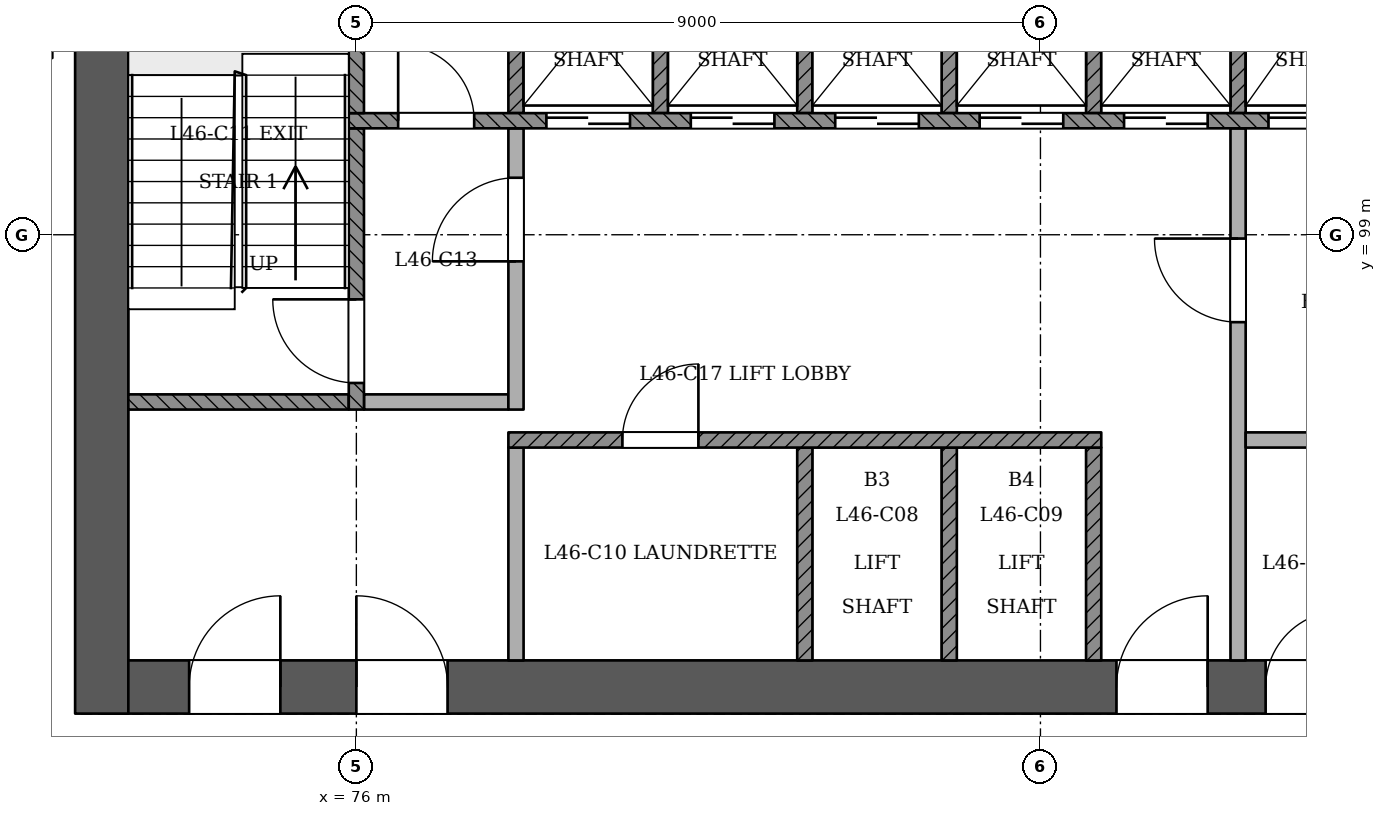
"""IFC4 building model, lengths in metres.
Left out: names, types, materials, properties, quantities, classifications, styles, units other than length and angle.
Written with IfcOpenShell. Run it as: python <this file> out.ifc"""

import sys

from ifc_helpers import new_model, si_unit, direction, frame, frame_2d, origin, place, context, subcontext, project, spatial, rectangle, extrude, element, fill, save


model = new_model("IFC4")
c1 = context("Model", 3, precision=1e-05, world=origin(), true_north=direction((0.0, 1.0)))
c2 = subcontext(c1, "Body", "Model", "MODEL_VIEW")
j1 = project(units=[si_unit("LENGTHUNIT", "METRE"), si_unit("PLANEANGLEUNIT", "RADIAN")], contexts=[c1])
p1 = place(None, origin())
s1 = spatial("IfcSite", under=j1, at=p1, CompositionType="ELEMENT")
p2 = place(p1, origin())
s2 = spatial("IfcBuilding", under=s1, at=p2, CompositionType="ELEMENT")
p3 = place(p2, frame((0.0, 0.0, 178.2)))
s3 = spatial("IfcBuildingStorey", under=s2, at=p3, CompositionType="ELEMENT", Elevation=178.2)
p4 = place(p3, frame((72.65, 93.05, 0.0), z_axis=(0.0, 0.0, 1.0), x_axis=(1.0, 0.0, 0.0)))
e1 = element("IfcWall", 1, at=p4, inside=s3, PredefinedType="SHEAR", context=c2, shape_type="SweptSolid", body=[
    extrude(rectangle(XDim=25.05, YDim=0.7, at=frame_2d((12.525, 0.0))), origin(), (0.0, 0.0, 1.0), 3.6),
])
p5 = place(p4, frame((1.15, 0.0, 0.0)))
e2 = element("IfcOpeningElement", 2, at=p5, cuts=e1, PredefinedType="OPENING", context=c2, shape_type="SweptSolid", body=[
    extrude(rectangle(XDim=1.2, YDim=2.1, at=frame_2d((0.6, 1.05))), frame((0.0, 0.36, 0.0), z_axis=(0.0, -1.0, 0.0), x_axis=(1.0, 0.0, 0.0)), (0.0, 0.0, 1.0), 0.721),
])
p6 = place(p4, frame((3.35, 0.0, 0.0)))
e3 = element("IfcOpeningElement", 3, at=p6, cuts=e1, PredefinedType="OPENING", context=c2, shape_type="SweptSolid", body=[
    extrude(rectangle(XDim=1.2, YDim=2.1, at=frame_2d((0.6, 1.05))), frame((0.0, 0.36, 0.0), z_axis=(0.0, -1.0, 0.0), x_axis=(1.0, 0.0, 0.0)), (0.0, 0.0, 1.0), 0.721),
])
p7 = place(p4, frame((13.35, 0.0, 0.0)))
e4 = element("IfcOpeningElement", 4, at=p7, cuts=e1, PredefinedType="OPENING", context=c2, shape_type="SweptSolid", body=[
    extrude(rectangle(XDim=1.2, YDim=2.1, at=frame_2d((0.6, 1.05))), frame((0.0, 0.36, 0.0), z_axis=(0.0, -1.0, 0.0), x_axis=(1.0, 0.0, 0.0)), (0.0, 0.0, 1.0), 0.721),
])
p8 = place(p4, frame((15.312, 0.0, 0.0)))
e5 = element("IfcOpeningElement", 5, at=p8, cuts=e1, PredefinedType="OPENING", context=c2, shape_type="SweptSolid", body=[
    extrude(rectangle(XDim=1.0, YDim=2.1, at=frame_2d((0.5, 1.05))), frame((0.0, 0.36, 0.0), z_axis=(0.0, -1.0, 0.0), x_axis=(1.0, 0.0, 0.0)), (0.0, 0.0, 1.0), 0.721),
])
p9 = place(p4, frame((18.15, 0.0, 0.0)))
e6 = element("IfcOpeningElement", 6, at=p9, cuts=e1, PredefinedType="OPENING", context=c2, shape_type="SweptSolid", body=[
    extrude(rectangle(XDim=1.0, YDim=2.1, at=frame_2d((0.5, 1.05))), frame((0.0, 0.36, 0.0), z_axis=(0.0, -1.0, 0.0), x_axis=(1.0, 0.0, 0.0)), (0.0, 0.0, 1.0), 0.721),
])
p10 = place(p4, frame((21.05, 0.0, 0.0)))
e7 = element("IfcOpeningElement", 7, at=p10, cuts=e1, PredefinedType="OPENING", context=c2, shape_type="SweptSolid", body=[
    extrude(rectangle(XDim=1.0, YDim=2.1, at=frame_2d((0.5, 1.05))), frame((0.0, 0.36, 0.0), z_axis=(0.0, -1.0, 0.0), x_axis=(1.0, 0.0, 0.0)), (0.0, 0.0, 1.0), 0.721),
])
p11 = place(p4, frame((22.938, 0.0, 0.0)))
e8 = element("IfcOpeningElement", 8, at=p11, cuts=e1, PredefinedType="OPENING", context=c2, shape_type="SweptSolid", body=[
    extrude(rectangle(XDim=1.0, YDim=2.1, at=frame_2d((0.5, 1.05))), frame((0.0, 0.36, 0.0), z_axis=(0.0, -1.0, 0.0), x_axis=(1.0, 0.0, 0.0)), (0.0, 0.0, 1.0), 0.721),
])
p12 = place(p3, frame((72.65, 103.75, 0.0), z_axis=(0.0, 0.0, 1.0), x_axis=(0.0, -1.0, 0.0)))
e9 = element("IfcWall", 9, at=p12, inside=s3, PredefinedType="SHEAR", context=c2, shape_type="SweptSolid", body=[
    extrude(rectangle(XDim=11.05, YDim=0.7, at=frame_2d((5.525, 0.0))), origin(), (0.0, 0.0, 1.0), 3.6),
])
p13 = place(p3, frame((78.1, 93.4, 0.0), z_axis=(0.0, 0.0, 1.0), x_axis=(0.0, 1.0, 0.0)))
e10 = element("IfcWall", 10, at=p13, inside=s3, PredefinedType="PARTITIONING", context=c2, shape_type="SweptSolid", body=[
    extrude(rectangle(XDim=2.8, YDim=0.2, at=frame_2d((1.4, 0.0))), origin(), (0.0, 0.0, 1.0), 3.15),
])
for number, where, z_axis, x_axis in (
    (11, (81.9, 93.4, 0.0), (0.0, 0.0, 1.0), (0.0, 1.0, 0.0)),
    (12, (83.8, 93.4, 0.0), (0.0, 0.0, 1.0), (0.0, 1.0, 0.0)),
    (13, (85.7, 93.4, 0.0), (0.0, 0.0, 1.0), (0.0, 1.0, 0.0)),
):
    element("IfcWall", number, at=place(p3, frame(where, z_axis=z_axis, x_axis=x_axis)), inside=s3, PredefinedType="SOLIDWALL", context=c2, shape_type="SweptSolid", body=[
        extrude(rectangle(XDim=2.8, YDim=0.2, at=frame_2d((1.4, 0.0))), origin(), (0.0, 0.0, 1.0), 3.15),
    ])
p14 = place(p3, frame((87.6, 93.4, 0.0), z_axis=(0.0, 0.0, 1.0), x_axis=(0.0, 1.0, 0.0)))
e14 = element("IfcWall", 14, at=p14, inside=s3, PredefinedType="PARTITIONING", context=c2, shape_type="SweptSolid", body=[
    extrude(rectangle(XDim=7.0, YDim=0.2, at=frame_2d((3.5, 0.0))), origin(), (0.0, 0.0, 1.0), 3.15),
])
p15 = place(p14, frame((4.45, 0.0, 0.0)))
e15 = element("IfcOpeningElement", 15, at=p15, cuts=e14, PredefinedType="OPENING", context=c2, shape_type="SweptSolid", body=[
    extrude(rectangle(XDim=1.1, YDim=2.1, at=frame_2d((0.55, 1.05))), frame((0.0, 0.11, 0.0), z_axis=(0.0, -1.0, 0.0), x_axis=(1.0, 0.0, 0.0)), (0.0, 0.0, 1.0), 0.221),
])
p16 = place(p3, frame((78.0, 96.3, 0.0), z_axis=(0.0, 0.0, 1.0), x_axis=(1.0, 0.0, 0.0)))
e16 = element("IfcWall", 16, at=p16, inside=s3, PredefinedType="SOLIDWALL", context=c2, shape_type="SweptSolid", body=[
    extrude(rectangle(XDim=7.8, YDim=0.2, at=frame_2d((3.9, 0.0))), origin(), (0.0, 0.0, 1.0), 3.15),
])
p17 = place(p16, frame((1.5, 0.0, 0.0)))
e17 = element("IfcOpeningElement", 17, at=p17, cuts=e16, PredefinedType="OPENING", context=c2, shape_type="SweptSolid", body=[
    extrude(rectangle(XDim=1.0, YDim=2.1, at=frame_2d((0.5, 1.05))), frame((0.0, 0.11, 0.0), z_axis=(0.0, -1.0, 0.0), x_axis=(1.0, 0.0, 0.0)), (0.0, 0.0, 1.0), 0.221),
])
p18 = place(p3, frame((87.7, 96.3, 0.0), z_axis=(0.0, 0.0, 1.0), x_axis=(1.0, 0.0, 0.0)))
e18 = element("IfcWall", 18, at=p18, inside=s3, PredefinedType="PARTITIONING", context=c2, shape_type="SweptSolid", body=[
    extrude(rectangle(XDim=3.6, YDim=0.2, at=frame_2d((1.8, 0.0))), origin(), (0.0, 0.0, 1.0), 3.15),
])
p19 = place(p3, frame((73.0, 96.8, 0.0), z_axis=(0.0, 0.0, 1.0), x_axis=(1.0, 0.0, 0.0)))
e19 = element("IfcWall", 19, at=p19, inside=s3, PredefinedType="SOLIDWALL", context=c2, shape_type="SweptSolid", body=[
    extrude(rectangle(XDim=2.9, YDim=0.2, at=frame_2d((1.45, 0.0))), origin(), (0.0, 0.0, 1.0), 3.15),
])
p20 = place(p3, frame((76.0, 96.7, 0.0), z_axis=(0.0, 0.0, 1.0), x_axis=(0.0, 1.0, 0.0)))
e20 = element("IfcWall", 20, at=p20, inside=s3, PredefinedType="SOLIDWALL", context=c2, shape_type="SweptSolid", body=[
    extrude(rectangle(XDim=3.7, YDim=0.2, at=frame_2d((1.85, 0.0))), origin(), (0.0, 0.0, 1.0), 3.15),
])
p21 = place(p20, frame((0.35, 0.0, 0.0)))
e21 = element("IfcOpeningElement", 21, at=p21, cuts=e20, PredefinedType="OPENING", context=c2, shape_type="SweptSolid", body=[
    extrude(rectangle(XDim=1.1, YDim=2.1, at=frame_2d((0.55, 1.05))), frame((0.0, 0.11, 0.0), z_axis=(0.0, -1.0, 0.0), x_axis=(1.0, 0.0, 0.0)), (0.0, 0.0, 1.0), 0.221),
])
p22 = place(p3, frame((76.1, 96.8, 0.0), z_axis=(0.0, 0.0, 1.0), x_axis=(1.0, 0.0, 0.0)))
e22 = element("IfcWall", 22, at=p22, inside=s3, PredefinedType="PARTITIONING", context=c2, shape_type="SweptSolid", body=[
    extrude(rectangle(XDim=1.9, YDim=0.2, at=frame_2d((0.95, 0.0))), origin(), (0.0, 0.0, 1.0), 3.15),
])
p23 = place(p3, frame((78.1, 96.7, 0.0), z_axis=(0.0, 0.0, 1.0), x_axis=(0.0, 1.0, 0.0)))
e23 = element("IfcWall", 23, at=p23, inside=s3, PredefinedType="PARTITIONING", context=c2, shape_type="SweptSolid", body=[
    extrude(rectangle(XDim=3.7, YDim=0.2, at=frame_2d((1.85, 0.0))), origin(), (0.0, 0.0, 1.0), 3.15),
])
p24 = place(p23, frame((1.95, 0.0, 0.0)))
e24 = element("IfcOpeningElement", 24, at=p24, cuts=e23, PredefinedType="OPENING", context=c2, shape_type="SweptSolid", body=[
    extrude(rectangle(XDim=1.1, YDim=2.1, at=frame_2d((0.55, 1.05))), frame((0.0, 0.11, 0.0), z_axis=(0.0, -1.0, 0.0), x_axis=(1.0, 0.0, 0.0)), (0.0, 0.0, 1.0), 0.221),
])
p25 = place(p3, frame((75.9, 100.5, 0.0), z_axis=(0.0, 0.0, 1.0), x_axis=(1.0, 0.0, 0.0)))
e25 = element("IfcWall", 25, at=p25, inside=s3, PredefinedType="SOLIDWALL", context=c2, shape_type="SweptSolid", body=[
    extrude(rectangle(XDim=18.2, YDim=0.2, at=frame_2d((9.1, 0.0))), origin(), (0.0, 0.0, 1.0), 3.15),
])
p26 = place(p25, frame((2.6, 0.0, 0.0)))
e26 = element("IfcOpeningElement", 26, at=p26, cuts=e25, PredefinedType="OPENING", context=c2, shape_type="SweptSolid", body=[
    extrude(rectangle(XDim=1.1, YDim=2.1, at=frame_2d((0.55, 1.05))), frame((0.0, 0.11, 0.0), z_axis=(0.0, -1.0, 0.0), x_axis=(1.0, 0.0, 0.0)), (0.0, 0.0, 1.0), 0.221),
])
p27 = place(p25, frame((4.5, 0.0, 0.0)))
e27 = element("IfcOpeningElement", 27, at=p27, cuts=e25, PredefinedType="OPENING", context=c2, shape_type="SweptSolid", body=[
    extrude(rectangle(XDim=1.1, YDim=2.1, at=frame_2d((0.55, 1.05))), frame((0.0, 0.11, 0.0), z_axis=(0.0, -1.0, 0.0), x_axis=(1.0, 0.0, 0.0)), (0.0, 0.0, 1.0), 0.221),
])
p28 = place(p25, frame((6.4, 0.0, 0.0)))
e28 = element("IfcOpeningElement", 28, at=p28, cuts=e25, PredefinedType="OPENING", context=c2, shape_type="SweptSolid", body=[
    extrude(rectangle(XDim=1.1, YDim=2.1, at=frame_2d((0.55, 1.05))), frame((0.0, 0.11, 0.0), z_axis=(0.0, -1.0, 0.0), x_axis=(1.0, 0.0, 0.0)), (0.0, 0.0, 1.0), 0.221),
])
p29 = place(p25, frame((8.3, 0.0, 0.0)))
e29 = element("IfcOpeningElement", 29, at=p29, cuts=e25, PredefinedType="OPENING", context=c2, shape_type="SweptSolid", body=[
    extrude(rectangle(XDim=1.1, YDim=2.1, at=frame_2d((0.55, 1.05))), frame((0.0, 0.11, 0.0), z_axis=(0.0, -1.0, 0.0), x_axis=(1.0, 0.0, 0.0)), (0.0, 0.0, 1.0), 0.221),
])
p30 = place(p25, frame((10.2, 0.0, 0.0)))
e30 = element("IfcOpeningElement", 30, at=p30, cuts=e25, PredefinedType="OPENING", context=c2, shape_type="SweptSolid", body=[
    extrude(rectangle(XDim=1.1, YDim=2.1, at=frame_2d((0.55, 1.05))), frame((0.0, 0.11, 0.0), z_axis=(0.0, -1.0, 0.0), x_axis=(1.0, 0.0, 0.0)), (0.0, 0.0, 1.0), 0.221),
])
p31 = place(p25, frame((12.1, 0.0, 0.0)))
e31 = element("IfcOpeningElement", 31, at=p31, cuts=e25, PredefinedType="OPENING", context=c2, shape_type="SweptSolid", body=[
    extrude(rectangle(XDim=1.1, YDim=2.1, at=frame_2d((0.55, 1.05))), frame((0.0, 0.11, 0.0), z_axis=(0.0, -1.0, 0.0), x_axis=(1.0, 0.0, 0.0)), (0.0, 0.0, 1.0), 0.221),
])
p32 = place(p25, frame((14.0, 0.0, 0.0)))
e32 = element("IfcOpeningElement", 32, at=p32, cuts=e25, PredefinedType="OPENING", context=c2, shape_type="SweptSolid", body=[
    extrude(rectangle(XDim=1.1, YDim=2.1, at=frame_2d((0.55, 1.05))), frame((0.0, 0.11, 0.0), z_axis=(0.0, -1.0, 0.0), x_axis=(1.0, 0.0, 0.0)), (0.0, 0.0, 1.0), 0.221),
])
p33 = place(p25, frame((0.65, 0.0, 0.0)))
e33 = element("IfcOpeningElement", 33, at=p33, cuts=e25, PredefinedType="OPENING", context=c2, shape_type="SweptSolid", body=[
    extrude(rectangle(XDim=1.0, YDim=2.1, at=frame_2d((0.5, 1.05))), frame((0.0, 0.11, 0.0), z_axis=(0.0, -1.0, 0.0), x_axis=(1.0, 0.0, 0.0)), (0.0, 0.0, 1.0), 0.221),
])
p34 = place(p25, frame((16.3, 0.0, 0.0)))
e34 = element("IfcOpeningElement", 34, at=p34, cuts=e25, PredefinedType="OPENING", context=c2, shape_type="SweptSolid", body=[
    extrude(rectangle(XDim=1.0, YDim=2.1, at=frame_2d((0.5, 1.05))), frame((0.0, 0.11, 0.0), z_axis=(0.0, -1.0, 0.0), x_axis=(1.0, 0.0, 0.0)), (0.0, 0.0, 1.0), 0.221),
])
for number, where, z_axis, x_axis in (
    (35, (76.0, 100.6, 0.0), (0.0, 0.0, 1.0), (0.0, 1.0, 0.0)),
    (36, (78.1, 100.6, 0.0), (0.0, 0.0, 1.0), (0.0, 1.0, 0.0)),
    (37, (80.0, 100.6, 0.0), (0.0, 0.0, 1.0), (0.0, 1.0, 0.0)),
    (38, (81.9, 100.6, 0.0), (0.0, 0.0, 1.0), (0.0, 1.0, 0.0)),
    (39, (83.8, 100.6, 0.0), (0.0, 0.0, 1.0), (0.0, 1.0, 0.0)),
    (40, (85.7, 100.6, 0.0), (0.0, 0.0, 1.0), (0.0, 1.0, 0.0)),
    (41, (87.6, 100.6, 0.0), (0.0, 0.0, 1.0), (0.0, 1.0, 0.0)),
):
    element("IfcWall", number, at=place(p3, frame(where, z_axis=z_axis, x_axis=x_axis)), inside=s3, PredefinedType="SOLIDWALL", context=c2, shape_type="SweptSolid", body=[
        extrude(rectangle(XDim=2.8, YDim=0.2, at=frame_2d((1.4, 0.0))), origin(), (0.0, 0.0, 1.0), 3.15),
    ])
p35 = place(p26, origin())
e42 = element("IfcDoor", 42, at=p35, inside=s3, OperationType="SLIDING_TO_RIGHT", PredefinedType="NOTDEFINED", context=c2, shape_type="SweptSolid", body=[
    extrude(rectangle(XDim=1.1, YDim=2.1, at=frame_2d((0.55, 1.05))), frame((0.0, 0.025, 0.0), z_axis=(0.0, -1.0, 0.0), x_axis=(1.0, 0.0, 0.0)), (0.0, 0.0, 1.0), 0.05),
])
fill(e26, e42)
p36 = place(p27, origin())
e43 = element("IfcDoor", 43, at=p36, inside=s3, OperationType="SLIDING_TO_LEFT", PredefinedType="NOTDEFINED", context=c2, shape_type="SweptSolid", body=[
    extrude(rectangle(XDim=1.1, YDim=2.1, at=frame_2d((0.55, 1.05))), frame((0.0, 0.025, 0.0), z_axis=(0.0, -1.0, 0.0), x_axis=(1.0, 0.0, 0.0)), (0.0, 0.0, 1.0), 0.05),
])
fill(e27, e43)
p37 = place(p28, origin())
e44 = element("IfcDoor", 44, at=p37, inside=s3, OperationType="SLIDING_TO_RIGHT", PredefinedType="NOTDEFINED", context=c2, shape_type="SweptSolid", body=[
    extrude(rectangle(XDim=1.1, YDim=2.1, at=frame_2d((0.55, 1.05))), frame((0.0, 0.025, 0.0), z_axis=(0.0, -1.0, 0.0), x_axis=(1.0, 0.0, 0.0)), (0.0, 0.0, 1.0), 0.05),
])
fill(e28, e44)
p38 = place(p29, origin())
e45 = element("IfcDoor", 45, at=p38, inside=s3, OperationType="SLIDING_TO_LEFT", PredefinedType="NOTDEFINED", context=c2, shape_type="SweptSolid", body=[
    extrude(rectangle(XDim=1.1, YDim=2.1, at=frame_2d((0.55, 1.05))), frame((0.0, 0.025, 0.0), z_axis=(0.0, -1.0, 0.0), x_axis=(1.0, 0.0, 0.0)), (0.0, 0.0, 1.0), 0.05),
])
fill(e29, e45)
p39 = place(p30, origin())
e46 = element("IfcDoor", 46, at=p39, inside=s3, OperationType="SLIDING_TO_RIGHT", PredefinedType="NOTDEFINED", context=c2, shape_type="SweptSolid", body=[
    extrude(rectangle(XDim=1.1, YDim=2.1, at=frame_2d((0.55, 1.05))), frame((0.0, 0.025, 0.0), z_axis=(0.0, -1.0, 0.0), x_axis=(1.0, 0.0, 0.0)), (0.0, 0.0, 1.0), 0.05),
])
fill(e30, e46)
p40 = place(p31, origin())
e47 = element("IfcDoor", 47, at=p40, inside=s3, OperationType="SLIDING_TO_RIGHT", PredefinedType="NOTDEFINED", context=c2, shape_type="SweptSolid", body=[
    extrude(rectangle(XDim=1.1, YDim=2.1, at=frame_2d((0.55, 1.05))), frame((0.0, 0.025, 0.0), z_axis=(0.0, -1.0, 0.0), x_axis=(1.0, 0.0, 0.0)), (0.0, 0.0, 1.0), 0.05),
])
fill(e31, e47)
p41 = place(p21, origin())
e48 = element("IfcDoor", 48, at=p41, inside=s3, OperationType="SINGLE_SWING_RIGHT", PredefinedType="NOTDEFINED", context=c2, shape_type="SweptSolid", body=[
    extrude(rectangle(XDim=1.1, YDim=2.1, at=frame_2d((0.55, 1.05))), frame((0.0, 0.025, 0.0), z_axis=(0.0, -1.0, 0.0), x_axis=(1.0, 0.0, 0.0)), (0.0, 0.0, 1.0), 0.05),
])
fill(e21, e48)
p42 = place(p24, origin())
e49 = element("IfcDoor", 49, at=p42, inside=s3, OperationType="SINGLE_SWING_LEFT", PredefinedType="NOTDEFINED", context=c2, shape_type="SweptSolid", body=[
    extrude(rectangle(XDim=1.1, YDim=2.1, at=frame_2d((0.55, 1.05))), frame((0.0, 0.025, 0.0), z_axis=(0.0, -1.0, 0.0), x_axis=(1.0, 0.0, 0.0)), (0.0, 0.0, 1.0), 0.05),
])
fill(e24, e49)
p43 = place(p15, origin())
e50 = element("IfcDoor", 50, at=p43, inside=s3, OperationType="SINGLE_SWING_RIGHT", PredefinedType="NOTDEFINED", context=c2, shape_type="SweptSolid", body=[
    extrude(rectangle(XDim=1.1, YDim=2.1, at=frame_2d((0.55, 1.05))), frame((0.0, 0.025, 0.0), z_axis=(0.0, -1.0, 0.0), x_axis=(1.0, 0.0, 0.0)), (0.0, 0.0, 1.0), 0.05),
])
fill(e15, e50)
p44 = place(p5, origin())
e51 = element("IfcDoor", 51, at=p44, inside=s3, OperationType="SINGLE_SWING_RIGHT", PredefinedType="NOTDEFINED", context=c2, shape_type="SweptSolid", body=[
    extrude(rectangle(XDim=1.2, YDim=2.1, at=frame_2d((0.6, 1.05))), frame((0.0, 0.025, 0.0), z_axis=(0.0, -1.0, 0.0), x_axis=(1.0, 0.0, 0.0)), (0.0, 0.0, 1.0), 0.05),
])
fill(e2, e51)
p45 = place(p6, origin())
e52 = element("IfcDoor", 52, at=p45, inside=s3, OperationType="SINGLE_SWING_LEFT", PredefinedType="NOTDEFINED", context=c2, shape_type="SweptSolid", body=[
    extrude(rectangle(XDim=1.2, YDim=2.1, at=frame_2d((0.6, 1.05))), frame((0.0, 0.025, 0.0), z_axis=(0.0, -1.0, 0.0), x_axis=(1.0, 0.0, 0.0)), (0.0, 0.0, 1.0), 0.05),
])
fill(e3, e52)
p46 = place(p7, origin())
e53 = element("IfcDoor", 53, at=p46, inside=s3, OperationType="SINGLE_SWING_RIGHT", PredefinedType="NOTDEFINED", context=c2, shape_type="SweptSolid", body=[
    extrude(rectangle(XDim=1.2, YDim=2.1, at=frame_2d((0.6, 1.05))), frame((0.0, 0.025, 0.0), z_axis=(0.0, -1.0, 0.0), x_axis=(1.0, 0.0, 0.0)), (0.0, 0.0, 1.0), 0.05),
])
fill(e4, e53)
p47 = place(p33, origin())
e54 = element("IfcDoor", 54, at=p47, inside=s3, OperationType="SINGLE_SWING_LEFT", PredefinedType="NOTDEFINED", context=c2, shape_type="SweptSolid", body=[
    extrude(rectangle(XDim=1.0, YDim=2.1, at=frame_2d((0.5, 1.05))), frame((0.0, 0.025, 0.0), z_axis=(0.0, -1.0, 0.0), x_axis=(1.0, 0.0, 0.0)), (0.0, 0.0, 1.0), 0.05),
])
fill(e33, e54)
p48 = place(p8, origin())
e55 = element("IfcDoor", 55, at=p48, inside=s3, OperationType="SINGLE_SWING_RIGHT", PredefinedType="NOTDEFINED", context=c2, shape_type="SweptSolid", body=[
    extrude(rectangle(XDim=1.0, YDim=2.1, at=frame_2d((0.5, 1.05))), frame((0.0, 0.025, 0.0), z_axis=(0.0, -1.0, 0.0), x_axis=(1.0, 0.0, 0.0)), (0.0, 0.0, 1.0), 0.05),
])
fill(e5, e55)
p49 = place(p17, origin())
e56 = element("IfcDoor", 56, at=p49, inside=s3, OperationType="SINGLE_SWING_RIGHT", PredefinedType="NOTDEFINED", context=c2, shape_type="SweptSolid", body=[
    extrude(rectangle(XDim=1.0, YDim=2.1, at=frame_2d((0.5, 1.05))), frame((0.0, 0.025, 0.0), z_axis=(0.0, -1.0, 0.0), x_axis=(1.0, 0.0, 0.0)), (0.0, 0.0, 1.0), 0.05),
])
fill(e17, e56)
save(model, sys.argv[1])
